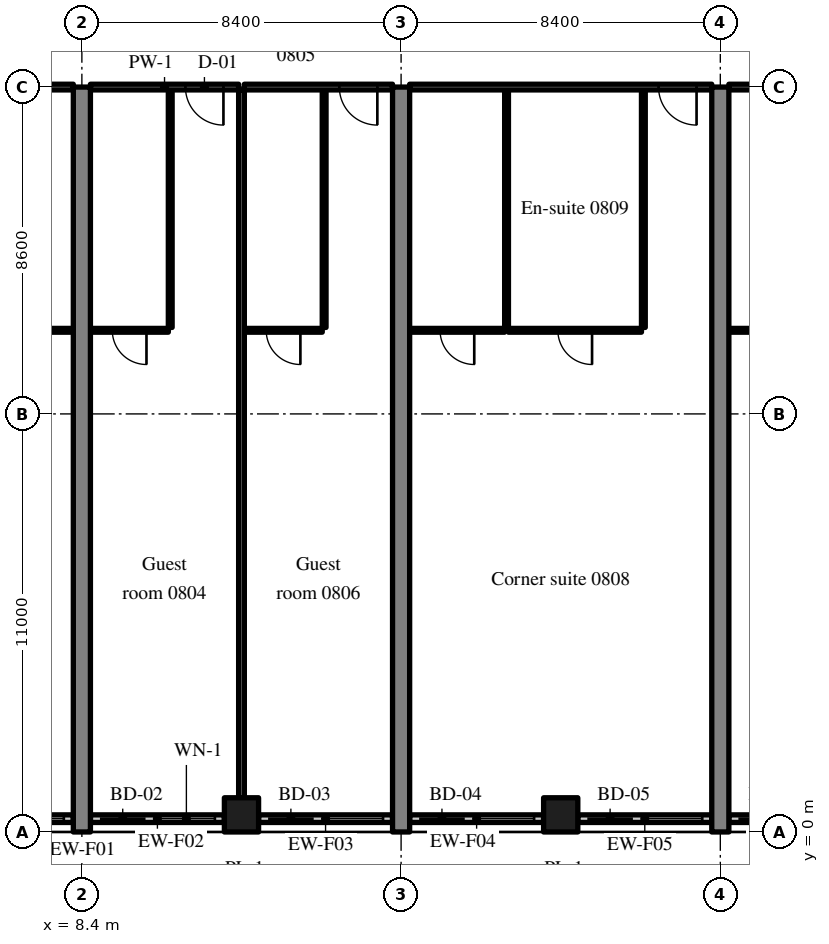
"""IFC4 building model, lengths in metres.
Left out: names, types, materials, properties, quantities, classifications, styles, units other than length and angle.
Written with IfcOpenShell. Run it as: python <this file> out.ifc"""

import sys

from ifc_helpers import new_model, si_unit, direction, frame, frame_2d, origin, origin_2d, place, context, subcontext, project, spatial, rectangle, extrude, source, transform, mapped, element, fill, save


model = new_model("IFC4")
c1 = context("Model", 3, precision=1e-05, world=origin(), true_north=direction((0.0, 1.0)))
c2 = subcontext(c1, "Body", "Model", "MODEL_VIEW")
j1 = project(units=[si_unit("LENGTHUNIT", "METRE"), si_unit("PLANEANGLEUNIT", "RADIAN")], contexts=[c1])
p1 = place(None, origin())
s1 = spatial("IfcSite", under=j1, at=p1, CompositionType="ELEMENT")
p2 = place(p1, origin())
s2 = spatial("IfcBuilding", under=s1, at=p2, CompositionType="ELEMENT")
p3 = place(p2, frame((0.0, 0.0, 39.2)))
s3 = spatial("IfcBuildingStorey", under=s2, at=p3, CompositionType="ELEMENT", Elevation=39.2)
m1 = source(origin(), c2, "Body", "SweptSolid", [
    extrude(rectangle(XDim=19.6, YDim=0.45, at=frame_2d((9.8, 0.0))), origin(), (0.0, 0.0, 1.0), 3.52),
])
for number, where, z_axis, x_axis in (
    (1, (8.4, 0.0, 0.0), (0.0, 0.0, 1.0), (0.0, 1.0, 0.0)),
    (2, (16.8, 0.0, 0.0), (0.0, 0.0, 1.0), (0.0, 1.0, 0.0)),
    (3, (25.2, 0.0, 0.0), (0.0, 0.0, 1.0), (0.0, 1.0, 0.0)),
):
    element("IfcWall", number, at=place(p3, frame(where, z_axis=z_axis, x_axis=x_axis)), inside=s3, PredefinedType="SHEAR", context=c2, shape_type="MappedRepresentation", body=[
        mapped(m1, transform((0.0, 0.0, 0.0), scale=1.0)),
    ])
m2 = source(origin(), c2, "Body", "SweptSolid", [
    extrude(rectangle(XDim=0.9, YDim=0.9, at=origin_2d()), origin(), (0.0, 0.0, 1.0), 3.52),
])
for number, where, z_axis, x_axis in (
    (4, (12.6, 0.45, 0.0), (0.0, 0.0, 1.0), (1.0, 0.0, 0.0)),
    (5, (21.0, 0.45, 0.0), (0.0, 0.0, 1.0), (1.0, 0.0, 0.0)),
):
    element("IfcColumn", number, at=place(p3, frame(where, z_axis=z_axis, x_axis=x_axis)), inside=s3, PredefinedType="COLUMN", context=c2, shape_type="MappedRepresentation", body=[
        mapped(m2, transform((0.0, 0.0, 0.0), scale=1.0)),
    ])
m3 = source(origin(), c2, "Body", "SweptSolid", [
    extrude(rectangle(XDim=4.03, YDim=0.2, at=frame_2d((2.015, 0.0))), origin(), (0.0, 0.0, 1.0), 2.77),
])
p4 = place(p3, frame((4.145, 0.35, 0.0), z_axis=(0.0, 0.0, 1.0), x_axis=(1.0, 0.0, 0.0)))
e6 = element("IfcWall", 6, at=p4, inside=s3, PredefinedType="SOLIDWALL", context=c2, shape_type="MappedRepresentation", body=[
    mapped(m3, transform((0.0, 0.0, 0.0), scale=1.0)),
])
m4 = source(origin(), c2, "Body", "SweptSolid", [
    extrude(rectangle(XDim=1.2, YDim=2.4, at=frame_2d((0.6, 1.2))), frame((0.0, 0.11, 0.0), z_axis=(0.0, -1.0, 0.0), x_axis=(1.0, 0.0, 0.0)), (0.0, 0.0, 1.0), 0.22),
])
p5 = place(p4, frame((0.25, 0.0, 0.0)))
e7 = element("IfcOpeningElement", 7, at=p5, cuts=e6, PredefinedType="OPENING", context=c2, shape_type="MappedRepresentation", body=[
    mapped(m4, transform((0.0, 0.0, 0.0), scale=1.0)),
])
m5 = source(origin(), c2, "Body", "SweptSolid", [
    extrude(rectangle(XDim=1.5, YDim=1.5, at=frame_2d((0.75, 0.75))), frame((0.0, 0.11, 0.0), z_axis=(0.0, -1.0, 0.0), x_axis=(1.0, 0.0, 0.0)), (0.0, 0.0, 1.0), 0.22),
])
p6 = place(p4, frame((2.28, 0.0, 0.9)))
e8 = element("IfcOpeningElement", 8, at=p6, cuts=e6, PredefinedType="OPENING", context=c2, shape_type="MappedRepresentation", body=[
    mapped(m5, transform((0.0, 0.0, 0.0), scale=1.0)),
])
m6 = source(origin(), c2, "Body", "SweptSolid", [
    extrude(rectangle(XDim=3.525, YDim=0.2, at=frame_2d((1.762, 0.0))), origin(), (0.0, 0.0, 1.0), 2.77),
])
p7 = place(p3, frame((8.625, 0.35, 0.0), z_axis=(0.0, 0.0, 1.0), x_axis=(1.0, 0.0, 0.0)))
e9 = element("IfcWall", 9, at=p7, inside=s3, PredefinedType="SOLIDWALL", context=c2, shape_type="MappedRepresentation", body=[
    mapped(m6, transform((0.0, 0.0, 0.0), scale=1.0)),
])
p8 = place(p7, frame((0.25, 0.0, 0.0)))
e10 = element("IfcOpeningElement", 10, at=p8, cuts=e9, PredefinedType="OPENING", context=c2, shape_type="MappedRepresentation", body=[
    mapped(m4, transform((0.0, 0.0, 0.0), scale=1.0)),
])
p9 = place(p7, frame((1.775, 0.0, 0.9)))
e11 = element("IfcOpeningElement", 11, at=p9, cuts=e9, PredefinedType="OPENING", context=c2, shape_type="MappedRepresentation", body=[
    mapped(m5, transform((0.0, 0.0, 0.0), scale=1.0)),
])
p10 = place(p3, frame((13.05, 0.35, 0.0), z_axis=(0.0, 0.0, 1.0), x_axis=(1.0, 0.0, 0.0)))
e12 = element("IfcWall", 12, at=p10, inside=s3, PredefinedType="SOLIDWALL", context=c2, shape_type="MappedRepresentation", body=[
    mapped(m6, transform((0.0, 0.0, 0.0), scale=1.0)),
])
p11 = place(p10, frame((0.25, 0.0, 0.0)))
e13 = element("IfcOpeningElement", 13, at=p11, cuts=e12, PredefinedType="OPENING", context=c2, shape_type="MappedRepresentation", body=[
    mapped(m4, transform((0.0, 0.0, 0.0), scale=1.0)),
])
p12 = place(p10, frame((1.775, 0.0, 0.9)))
e14 = element("IfcOpeningElement", 14, at=p12, cuts=e12, PredefinedType="OPENING", context=c2, shape_type="MappedRepresentation", body=[
    mapped(m5, transform((0.0, 0.0, 0.0), scale=1.0)),
])
m7 = source(origin(), c2, "Body", "SweptSolid", [
    extrude(rectangle(XDim=3.525, YDim=0.2, at=frame_2d((1.763, 0.0))), origin(), (0.0, 0.0, 1.0), 2.77),
])
p13 = place(p3, frame((17.025, 0.35, 0.0), z_axis=(0.0, 0.0, 1.0), x_axis=(1.0, 0.0, 0.0)))
e15 = element("IfcWall", 15, at=p13, inside=s3, PredefinedType="SOLIDWALL", context=c2, shape_type="MappedRepresentation", body=[
    mapped(m7, transform((0.0, 0.0, 0.0), scale=1.0)),
])
p14 = place(p13, frame((0.25, 0.0, 0.0)))
e16 = element("IfcOpeningElement", 16, at=p14, cuts=e15, PredefinedType="OPENING", context=c2, shape_type="MappedRepresentation", body=[
    mapped(m4, transform((0.0, 0.0, 0.0), scale=1.0)),
])
p15 = place(p13, frame((1.775, 0.0, 0.9)))
e17 = element("IfcOpeningElement", 17, at=p15, cuts=e15, PredefinedType="OPENING", context=c2, shape_type="MappedRepresentation", body=[
    mapped(m5, transform((0.0, 0.0, 0.0), scale=1.0)),
])
p16 = place(p3, frame((21.45, 0.35, 0.0), z_axis=(0.0, 0.0, 1.0), x_axis=(1.0, 0.0, 0.0)))
e18 = element("IfcWall", 18, at=p16, inside=s3, PredefinedType="SOLIDWALL", context=c2, shape_type="MappedRepresentation", body=[
    mapped(m7, transform((0.0, 0.0, 0.0), scale=1.0)),
])
p17 = place(p16, frame((0.25, 0.0, 0.0)))
e19 = element("IfcOpeningElement", 19, at=p17, cuts=e18, PredefinedType="OPENING", context=c2, shape_type="MappedRepresentation", body=[
    mapped(m4, transform((0.0, 0.0, 0.0), scale=1.0)),
])
p18 = place(p16, frame((1.775, 0.0, 0.9)))
e20 = element("IfcOpeningElement", 20, at=p18, cuts=e18, PredefinedType="OPENING", context=c2, shape_type="MappedRepresentation", body=[
    mapped(m5, transform((0.0, 0.0, 0.0), scale=1.0)),
])
p19 = place(p3, frame((25.425, 0.35, 0.0), z_axis=(0.0, 0.0, 1.0), x_axis=(1.0, 0.0, 0.0)))
e21 = element("IfcWall", 21, at=p19, inside=s3, PredefinedType="SOLIDWALL", context=c2, shape_type="MappedRepresentation", body=[
    mapped(m6, transform((0.0, 0.0, 0.0), scale=1.0)),
])
p20 = place(p19, frame((0.25, 0.0, 0.0)))
e22 = element("IfcOpeningElement", 22, at=p20, cuts=e21, PredefinedType="OPENING", context=c2, shape_type="MappedRepresentation", body=[
    mapped(m4, transform((0.0, 0.0, 0.0), scale=1.0)),
])
p21 = place(p19, frame((1.775, 0.0, 0.9)))
e23 = element("IfcOpeningElement", 23, at=p21, cuts=e21, PredefinedType="OPENING", context=c2, shape_type="MappedRepresentation", body=[
    mapped(m5, transform((0.0, 0.0, 0.0), scale=1.0)),
])
m8 = source(origin(), c2, "Body", "SweptSolid", [
    extrude(rectangle(XDim=2.275, YDim=0.1, at=frame_2d((1.138, 0.0))), origin(), (0.0, 0.0, 1.0), 3.52),
])
p22 = place(p3, frame((5.9, 13.2, 0.0), z_axis=(0.0, 0.0, 1.0), x_axis=(1.0, 0.0, 0.0)))
e24 = element("IfcWall", 24, at=p22, inside=s3, PredefinedType="PARTITIONING", context=c2, shape_type="MappedRepresentation", body=[
    mapped(m8, transform((0.0, 0.0, 0.0), scale=1.0)),
])
m9 = source(origin(), c2, "Body", "SweptSolid", [
    extrude(rectangle(XDim=0.9, YDim=2.1, at=frame_2d((0.45, 1.05))), frame((0.0, 0.06, 0.0), z_axis=(0.0, -1.0, 0.0), x_axis=(1.0, 0.0, 0.0)), (0.0, 0.0, 1.0), 0.12),
])
p23 = place(p22, frame((0.687, 0.0, 0.0)))
e25 = element("IfcOpeningElement", 25, at=p23, cuts=e24, PredefinedType="OPENING", context=c2, shape_type="MappedRepresentation", body=[
    mapped(m9, transform((0.0, 0.0, 0.0), scale=1.0)),
])
m10 = source(origin(), c2, "Body", "SweptSolid", [
    extrude(rectangle(XDim=7.725, YDim=0.15, at=frame_2d((3.863, 0.0))), origin(), (0.0, 0.0, 1.0), 2.82),
])
p24 = place(p3, frame((0.45, 19.6, 0.0), z_axis=(0.0, 0.0, 1.0), x_axis=(1.0, 0.0, 0.0)))
e26 = element("IfcWall", 26, at=p24, inside=s3, PredefinedType="PARTITIONING", context=c2, shape_type="MappedRepresentation", body=[
    mapped(m10, transform((0.0, 0.0, 0.0), scale=1.0)),
])
m11 = source(origin(), c2, "Body", "SweptSolid", [
    extrude(rectangle(XDim=1.0, YDim=2.1, at=frame_2d((0.5, 1.05))), frame((0.0, 0.085, 0.0), z_axis=(0.0, -1.0, 0.0), x_axis=(1.0, 0.0, 0.0)), (0.0, 0.0, 1.0), 0.17),
])
p25 = place(p24, frame((0.4, 0.0, 0.0)))
e27 = element("IfcOpeningElement", 27, at=p25, cuts=e26, PredefinedType="OPENING", context=c2, shape_type="MappedRepresentation", body=[
    mapped(m11, transform((0.0, 0.0, 0.0), scale=1.0)),
])
m12 = source(origin(), c2, "Body", "SweptSolid", [
    extrude(rectangle(XDim=6.25, YDim=0.1, at=frame_2d((3.125, 0.0))), origin(), (0.0, 0.0, 1.0), 3.52),
])
p26 = place(p3, frame((10.725, 13.275, 0.0), z_axis=(0.0, 0.0, 1.0), x_axis=(0.0, 1.0, 0.0)))
e28 = element("IfcWall", 28, at=p26, inside=s3, PredefinedType="PARTITIONING", context=c2, shape_type="MappedRepresentation", body=[
    mapped(m12, transform((0.0, 0.0, 0.0), scale=1.0)),
])
m13 = source(origin(), c2, "Body", "SweptSolid", [
    extrude(rectangle(XDim=2.05, YDim=0.1, at=frame_2d((1.025, 0.0))), origin(), (0.0, 0.0, 1.0), 3.52),
])
p27 = place(p3, frame((8.625, 13.2, 0.0), z_axis=(0.0, 0.0, 1.0), x_axis=(1.0, 0.0, 0.0)))
e29 = element("IfcWall", 29, at=p27, inside=s3, PredefinedType="PARTITIONING", context=c2, shape_type="MappedRepresentation", body=[
    mapped(m13, transform((0.0, 0.0, 0.0), scale=1.0)),
])
p28 = place(p27, frame((0.575, 0.0, 0.0)))
e30 = element("IfcOpeningElement", 30, at=p28, cuts=e29, PredefinedType="OPENING", context=c2, shape_type="MappedRepresentation", body=[
    mapped(m9, transform((0.0, 0.0, 0.0), scale=1.0)),
])
m14 = source(origin(), c2, "Body", "SweptSolid", [
    extrude(rectangle(XDim=3.9, YDim=0.15, at=frame_2d((1.95, 0.0))), origin(), (0.0, 0.0, 1.0), 2.82),
])
p29 = place(p3, frame((8.625, 19.6, 0.0), z_axis=(0.0, 0.0, 1.0), x_axis=(1.0, 0.0, 0.0)))
e31 = element("IfcWall", 31, at=p29, inside=s3, PredefinedType="PARTITIONING", context=c2, shape_type="MappedRepresentation", body=[
    mapped(m14, transform((0.0, 0.0, 0.0), scale=1.0)),
])
p30 = place(p29, frame((2.5, 0.0, 0.0)))
e32 = element("IfcOpeningElement", 32, at=p30, cuts=e31, PredefinedType="OPENING", context=c2, shape_type="MappedRepresentation", body=[
    mapped(m11, transform((0.0, 0.0, 0.0), scale=1.0)),
])
p31 = place(p3, frame((14.775, 13.275, 0.0), z_axis=(0.0, 0.0, 1.0), x_axis=(0.0, 1.0, 0.0)))
e33 = element("IfcWall", 33, at=p31, inside=s3, PredefinedType="PARTITIONING", context=c2, shape_type="MappedRepresentation", body=[
    mapped(m12, transform((0.0, 0.0, 0.0), scale=1.0)),
])
p32 = place(p3, frame((12.675, 13.2, 0.0), z_axis=(0.0, 0.0, 1.0), x_axis=(1.0, 0.0, 0.0)))
e34 = element("IfcWall", 34, at=p32, inside=s3, PredefinedType="PARTITIONING", context=c2, shape_type="MappedRepresentation", body=[
    mapped(m13, transform((0.0, 0.0, 0.0), scale=1.0)),
])
p33 = place(p32, frame((0.575, 0.0, 0.0)))
e35 = element("IfcOpeningElement", 35, at=p33, cuts=e34, PredefinedType="OPENING", context=c2, shape_type="MappedRepresentation", body=[
    mapped(m9, transform((0.0, 0.0, 0.0), scale=1.0)),
])
p34 = place(p3, frame((12.675, 19.6, 0.0), z_axis=(0.0, 0.0, 1.0), x_axis=(1.0, 0.0, 0.0)))
e36 = element("IfcWall", 36, at=p34, inside=s3, PredefinedType="PARTITIONING", context=c2, shape_type="MappedRepresentation", body=[
    mapped(m14, transform((0.0, 0.0, 0.0), scale=1.0)),
])
p35 = place(p34, frame((2.5, 0.0, 0.0)))
e37 = element("IfcOpeningElement", 37, at=p35, cuts=e36, PredefinedType="OPENING", context=c2, shape_type="MappedRepresentation", body=[
    mapped(m11, transform((0.0, 0.0, 0.0), scale=1.0)),
])
m15 = source(origin(), c2, "Body", "SweptSolid", [
    extrude(rectangle(XDim=18.625, YDim=0.15, at=frame_2d((9.312, 0.0))), origin(), (0.0, 0.0, 1.0), 3.52),
])
p36 = place(p3, frame((12.6, 0.9, 0.0), z_axis=(0.0, 0.0, 1.0), x_axis=(0.0, 1.0, 0.0)))
e38 = element("IfcWall", 38, at=p36, inside=s3, PredefinedType="PARTITIONING", context=c2, shape_type="MappedRepresentation", body=[
    mapped(m15, transform((0.0, 0.0, 0.0), scale=1.0)),
])
for number, where, z_axis, x_axis in (
    (39, (23.175, 13.275, 0.0), (0.0, 0.0, 1.0), (0.0, 1.0, 0.0)),
    (40, (19.575, 13.275, 0.0), (0.0, 0.0, 1.0), (0.0, 1.0, 0.0)),
):
    element("IfcWall", number, at=place(p3, frame(where, z_axis=z_axis, x_axis=x_axis)), inside=s3, PredefinedType="PARTITIONING", context=c2, shape_type="MappedRepresentation", body=[
        mapped(m12, transform((0.0, 0.0, 0.0), scale=1.0)),
    ])
m16 = source(origin(), c2, "Body", "SweptSolid", [
    extrude(rectangle(XDim=3.5, YDim=0.1, at=frame_2d((1.75, 0.0))), origin(), (0.0, 0.0, 1.0), 3.52),
])
p37 = place(p3, frame((19.625, 13.2, 0.0), z_axis=(0.0, 0.0, 1.0), x_axis=(1.0, 0.0, 0.0)))
e41 = element("IfcWall", 41, at=p37, inside=s3, PredefinedType="PARTITIONING", context=c2, shape_type="MappedRepresentation", body=[
    mapped(m16, transform((0.0, 0.0, 0.0), scale=1.0)),
])
p38 = place(p37, frame((1.3, 0.0, 0.0)))
e42 = element("IfcOpeningElement", 42, at=p38, cuts=e41, PredefinedType="OPENING", context=c2, shape_type="MappedRepresentation", body=[
    mapped(m9, transform((0.0, 0.0, 0.0), scale=1.0)),
])
m17 = source(origin(), c2, "Body", "SweptSolid", [
    extrude(rectangle(XDim=2.5, YDim=0.1, at=frame_2d((1.25, 0.0))), origin(), (0.0, 0.0, 1.0), 3.52),
])
p39 = place(p3, frame((17.025, 13.2, 0.0), z_axis=(0.0, 0.0, 1.0), x_axis=(1.0, 0.0, 0.0)))
e43 = element("IfcWall", 43, at=p39, inside=s3, PredefinedType="PARTITIONING", context=c2, shape_type="MappedRepresentation", body=[
    mapped(m17, transform((0.0, 0.0, 0.0), scale=1.0)),
])
p40 = place(p39, frame((0.8, 0.0, 0.0)))
e44 = element("IfcOpeningElement", 44, at=p40, cuts=e43, PredefinedType="OPENING", context=c2, shape_type="MappedRepresentation", body=[
    mapped(m9, transform((0.0, 0.0, 0.0), scale=1.0)),
])
m18 = source(origin(), c2, "Body", "SweptSolid", [
    extrude(rectangle(XDim=7.95, YDim=0.15, at=frame_2d((3.975, 0.0))), origin(), (0.0, 0.0, 1.0), 2.82),
])
p41 = place(p3, frame((17.025, 19.6, 0.0), z_axis=(0.0, 0.0, 1.0), x_axis=(1.0, 0.0, 0.0)))
e45 = element("IfcWall", 45, at=p41, inside=s3, PredefinedType="PARTITIONING", context=c2, shape_type="MappedRepresentation", body=[
    mapped(m18, transform((0.0, 0.0, 0.0), scale=1.0)),
])
p42 = place(p41, frame((6.55, 0.0, 0.0)))
e46 = element("IfcOpeningElement", 46, at=p42, cuts=e45, PredefinedType="OPENING", context=c2, shape_type="MappedRepresentation", body=[
    mapped(m11, transform((0.0, 0.0, 0.0), scale=1.0)),
])
p43 = place(p3, frame((25.425, 13.2, 0.0), z_axis=(0.0, 0.0, 1.0), x_axis=(1.0, 0.0, 0.0)))
e47 = element("IfcWall", 47, at=p43, inside=s3, PredefinedType="PARTITIONING", context=c2, shape_type="MappedRepresentation", body=[
    mapped(m17, transform((0.0, 0.0, 0.0), scale=1.0)),
])
p44 = place(p43, frame((0.8, 0.0, 0.0)))
e48 = element("IfcOpeningElement", 48, at=p44, cuts=e47, PredefinedType="OPENING", context=c2, shape_type="MappedRepresentation", body=[
    mapped(m9, transform((0.0, 0.0, 0.0), scale=1.0)),
])
m19 = source(origin(), c2, "Body", "SweptSolid", [
    extrude(rectangle(XDim=7.95, YDim=0.15, at=frame_2d((3.975, 0.0))), origin(), (0.0, 0.0, 1.0), 2.82),
])
p45 = place(p3, frame((25.425, 19.6, 0.0), z_axis=(0.0, 0.0, 1.0), x_axis=(1.0, 0.0, 0.0)))
e49 = element("IfcWall", 49, at=p45, inside=s3, PredefinedType="PARTITIONING", context=c2, shape_type="MappedRepresentation", body=[
    mapped(m19, transform((0.0, 0.0, 0.0), scale=1.0)),
])
p46 = place(p45, frame((6.55, 0.0, 0.0)))
e50 = element("IfcOpeningElement", 50, at=p46, cuts=e49, PredefinedType="OPENING", context=c2, shape_type="MappedRepresentation", body=[
    mapped(m11, transform((0.0, 0.0, 0.0), scale=1.0)),
])
m20 = source(origin(), c2, "Body", "SweptSolid", [
    extrude(rectangle(XDim=1.5, YDim=1.5, at=frame_2d((0.75, 0.75))), frame((0.0, 0.03, 0.0), z_axis=(0.0, -1.0, 0.0), x_axis=(1.0, 0.0, 0.0)), (0.0, 0.0, 1.0), 0.06),
])
p47 = place(p6, origin())
e51 = element("IfcWindow", 51, at=p47, inside=s3, PartitioningType="SINGLE_PANEL", PredefinedType="WINDOW", context=c2, shape_type="MappedRepresentation", body=[
    mapped(m20, transform((0.0, 0.0, 0.0), scale=1.0)),
])
fill(e8, e51)
m21 = source(origin(), c2, "Body", "SweptSolid", [
    extrude(rectangle(XDim=1.2, YDim=2.4, at=frame_2d((0.6, 1.2))), frame((0.0, 0.025, 0.0), z_axis=(0.0, -1.0, 0.0), x_axis=(1.0, 0.0, 0.0)), (0.0, 0.0, 1.0), 0.05),
])
p48 = place(p8, origin())
e52 = element("IfcDoor", 52, at=p48, inside=s3, OperationType="SLIDING_TO_RIGHT", PredefinedType="DOOR", context=c2, shape_type="MappedRepresentation", body=[
    mapped(m21, transform((0.0, 0.0, 0.0), scale=1.0)),
])
fill(e10, e52)
p49 = place(p9, origin())
e53 = element("IfcWindow", 53, at=p49, inside=s3, PartitioningType="SINGLE_PANEL", PredefinedType="WINDOW", context=c2, shape_type="MappedRepresentation", body=[
    mapped(m20, transform((0.0, 0.0, 0.0), scale=1.0)),
])
fill(e11, e53)
p50 = place(p11, origin())
e54 = element("IfcDoor", 54, at=p50, inside=s3, OperationType="SLIDING_TO_LEFT", PredefinedType="DOOR", context=c2, shape_type="MappedRepresentation", body=[
    mapped(m21, transform((0.0, 0.0, 0.0), scale=1.0)),
])
fill(e13, e54)
p51 = place(p12, origin())
e55 = element("IfcWindow", 55, at=p51, inside=s3, PartitioningType="SINGLE_PANEL", PredefinedType="WINDOW", context=c2, shape_type="MappedRepresentation", body=[
    mapped(m20, transform((0.0, 0.0, 0.0), scale=1.0)),
])
fill(e14, e55)
p52 = place(p14, origin())
e56 = element("IfcDoor", 56, at=p52, inside=s3, OperationType="SLIDING_TO_RIGHT", PredefinedType="DOOR", context=c2, shape_type="MappedRepresentation", body=[
    mapped(m21, transform((0.0, 0.0, 0.0), scale=1.0)),
])
fill(e16, e56)
p53 = place(p15, origin())
e57 = element("IfcWindow", 57, at=p53, inside=s3, PartitioningType="SINGLE_PANEL", PredefinedType="WINDOW", context=c2, shape_type="MappedRepresentation", body=[
    mapped(m20, transform((0.0, 0.0, 0.0), scale=1.0)),
])
fill(e17, e57)
p54 = place(p17, origin())
e58 = element("IfcDoor", 58, at=p54, inside=s3, OperationType="SLIDING_TO_LEFT", PredefinedType="DOOR", context=c2, shape_type="MappedRepresentation", body=[
    mapped(m21, transform((0.0, 0.0, 0.0), scale=1.0)),
])
fill(e19, e58)
p55 = place(p18, origin())
e59 = element("IfcWindow", 59, at=p55, inside=s3, PartitioningType="SINGLE_PANEL", PredefinedType="WINDOW", context=c2, shape_type="MappedRepresentation", body=[
    mapped(m20, transform((0.0, 0.0, 0.0), scale=1.0)),
])
fill(e20, e59)
p56 = place(p20, origin())
e60 = element("IfcDoor", 60, at=p56, inside=s3, OperationType="SLIDING_TO_RIGHT", PredefinedType="DOOR", context=c2, shape_type="MappedRepresentation", body=[
    mapped(m21, transform((0.0, 0.0, 0.0), scale=1.0)),
])
fill(e22, e60)
m22 = source(origin(), c2, "Body", "SweptSolid", [
    extrude(rectangle(XDim=0.9, YDim=2.1, at=frame_2d((0.45, 1.05))), frame((0.0, 0.025, 0.0), z_axis=(0.0, -1.0, 0.0), x_axis=(1.0, 0.0, 0.0)), (0.0, 0.0, 1.0), 0.05),
])
p57 = place(p28, origin())
e61 = element("IfcDoor", 61, at=p57, inside=s3, OperationType="SINGLE_SWING_RIGHT", PredefinedType="DOOR", context=c2, shape_type="MappedRepresentation", body=[
    mapped(m22, transform((0.0, 0.0, 0.0), scale=1.0)),
])
fill(e30, e61)
m23 = source(origin(), c2, "Body", "SweptSolid", [
    extrude(rectangle(XDim=1.0, YDim=2.1, at=frame_2d((0.5, 1.05))), frame((0.0, 0.025, 0.0), z_axis=(0.0, -1.0, 0.0), x_axis=(1.0, 0.0, 0.0)), (0.0, 0.0, 1.0), 0.05),
])
p58 = place(p30, origin())
e62 = element("IfcDoor", 62, at=p58, inside=s3, OperationType="SINGLE_SWING_RIGHT", PredefinedType="DOOR", context=c2, shape_type="MappedRepresentation", body=[
    mapped(m23, transform((0.0, 0.0, 0.0), scale=1.0)),
])
fill(e32, e62)
p59 = place(p33, origin())
e63 = element("IfcDoor", 63, at=p59, inside=s3, OperationType="SINGLE_SWING_RIGHT", PredefinedType="DOOR", context=c2, shape_type="MappedRepresentation", body=[
    mapped(m22, transform((0.0, 0.0, 0.0), scale=1.0)),
])
fill(e35, e63)
p60 = place(p35, origin())
e64 = element("IfcDoor", 64, at=p60, inside=s3, OperationType="SINGLE_SWING_RIGHT", PredefinedType="DOOR", context=c2, shape_type="MappedRepresentation", body=[
    mapped(m23, transform((0.0, 0.0, 0.0), scale=1.0)),
])
fill(e37, e64)
p61 = place(p38, origin())
e65 = element("IfcDoor", 65, at=p61, inside=s3, OperationType="SINGLE_SWING_RIGHT", PredefinedType="DOOR", context=c2, shape_type="MappedRepresentation", body=[
    mapped(m22, transform((0.0, 0.0, 0.0), scale=1.0)),
])
fill(e42, e65)
p62 = place(p40, origin())
e66 = element("IfcDoor", 66, at=p62, inside=s3, OperationType="SINGLE_SWING_RIGHT", PredefinedType="DOOR", context=c2, shape_type="MappedRepresentation", body=[
    mapped(m22, transform((0.0, 0.0, 0.0), scale=1.0)),
])
fill(e44, e66)
p63 = place(p42, origin())
e67 = element("IfcDoor", 67, at=p63, inside=s3, OperationType="SINGLE_SWING_RIGHT", PredefinedType="DOOR", context=c2, shape_type="MappedRepresentation", body=[
    mapped(m23, transform((0.0, 0.0, 0.0), scale=1.0)),
])
fill(e46, e67)
save(model, sys.argv[1])
